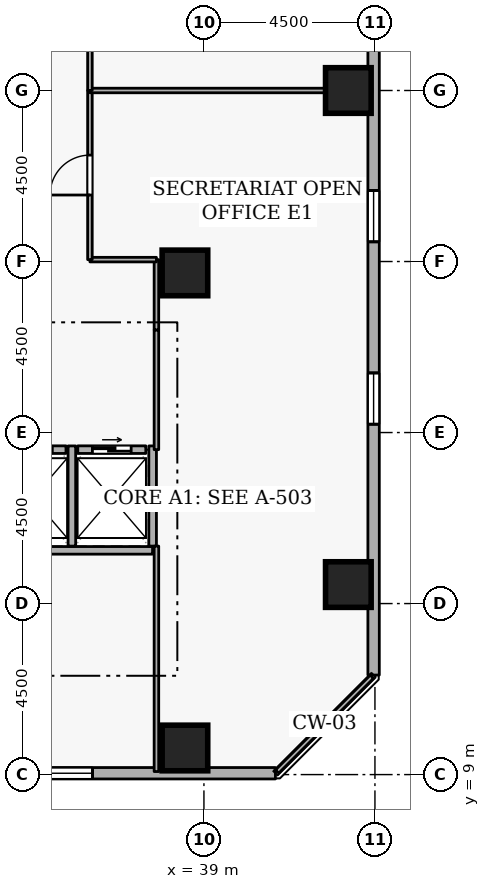
"""IFC4 building model, lengths in metres.
Left out: names, types, materials, properties, quantities, classifications, styles, units other than length and angle.
Written with IfcOpenShell. Run it as: python <this file> out.ifc"""

import sys

from ifc_helpers import new_model, si_unit, direction, frame, frame_2d, origin, origin_2d, place, context, subcontext, project, spatial, rectangle, extrude, element, fill, save


model = new_model("IFC4")
c1 = context("Model", 3, precision=1e-05, world=origin(), true_north=direction((0.0, 1.0)))
c2 = subcontext(c1, "Body", "Model", "MODEL_VIEW")
j1 = project(units=[si_unit("LENGTHUNIT", "METRE"), si_unit("PLANEANGLEUNIT", "RADIAN")], contexts=[c1])
p1 = place(None, origin())
s1 = spatial("IfcSite", under=j1, at=p1, CompositionType="ELEMENT")
p2 = place(p1, origin())
s2 = spatial("IfcBuilding", under=s1, at=p2, CompositionType="ELEMENT")
p3 = place(p2, frame((0.0, 0.0, 116.1)))
s3 = spatial("IfcBuildingStorey", under=s2, at=p3, CompositionType="ELEMENT", Elevation=116.1)
for number, where, z_axis, x_axis in (
    (1, (38.5, 9.7, 0.0), (0.0, 0.0, 1.0), (1.0, 0.0, 0.0)),
    (2, (42.8, 14.0, 0.0), (0.0, 0.0, 1.0), (1.0, 0.0, 0.0)),
    (3, (42.8, 27.0, 0.0), (0.0, 0.0, 1.0), (1.0, 0.0, 0.0)),
    (4, (38.5, 22.2, 0.0), (0.0, 0.0, 1.0), (1.0, 0.0, 0.0)),
):
    element("IfcColumn", number, at=place(p3, frame(where, z_axis=z_axis, x_axis=x_axis)), inside=s3, PredefinedType="COLUMN", context=c2, shape_type="SweptSolid", body=[
        extrude(rectangle(XDim=1.2, YDim=1.2, at=origin_2d()), origin(), (0.0, 0.0, 1.0), 3.6),
    ])
p4 = place(p3, frame((4.119, 9.035, 0.0), z_axis=(0.0, 0.0, 1.0), x_axis=(1.0, 0.0, 0.0)))
e5 = element("IfcWall", 5, at=p4, inside=s3, PredefinedType="STANDARD", context=c2, shape_type="SweptSolid", body=[
    extrude(rectangle(XDim=36.763, YDim=0.3, at=frame_2d((18.381, 0.0))), origin(), (0.0, 0.0, 1.0), 2.22),
])
p5 = place(p4, frame((1.8, 0.0, 0.72)))
e6 = element("IfcOpeningElement", 6, at=p5, cuts=e5, PredefinedType="OPENING", context=c2, shape_type="SweptSolid", body=[
    extrude(rectangle(XDim=1.35, YDim=1.05, at=frame_2d((0.675, 0.525))), frame((0.0, 0.16, 0.0), z_axis=(0.0, -1.0, 0.0), x_axis=(1.0, 0.0, 0.0)), (0.0, 0.0, 1.0), 0.32),
])
p6 = place(p4, frame((11.4, 0.0, 0.72)))
e7 = element("IfcOpeningElement", 7, at=p6, cuts=e5, PredefinedType="OPENING", context=c2, shape_type="SweptSolid", body=[
    extrude(rectangle(XDim=1.35, YDim=1.05, at=frame_2d((0.675, 0.525))), frame((0.0, 0.16, 0.0), z_axis=(0.0, -1.0, 0.0), x_axis=(1.0, 0.0, 0.0)), (0.0, 0.0, 1.0), 0.32),
])
p7 = place(p4, frame((16.2, 0.0, 0.72)))
e8 = element("IfcOpeningElement", 8, at=p7, cuts=e5, PredefinedType="OPENING", context=c2, shape_type="SweptSolid", body=[
    extrude(rectangle(XDim=1.35, YDim=1.05, at=frame_2d((0.675, 0.525))), frame((0.0, 0.16, 0.0), z_axis=(0.0, -1.0, 0.0), x_axis=(1.0, 0.0, 0.0)), (0.0, 0.0, 1.0), 0.32),
])
p8 = place(p4, frame((25.8, 0.0, 0.72)))
e9 = element("IfcOpeningElement", 9, at=p8, cuts=e5, PredefinedType="OPENING", context=c2, shape_type="SweptSolid", body=[
    extrude(rectangle(XDim=1.35, YDim=1.05, at=frame_2d((0.675, 0.525))), frame((0.0, 0.16, 0.0), z_axis=(0.0, -1.0, 0.0), x_axis=(1.0, 0.0, 0.0)), (0.0, 0.0, 1.0), 0.32),
])
p9 = place(p4, frame((30.6, 0.0, 0.72)))
e10 = element("IfcOpeningElement", 10, at=p9, cuts=e5, PredefinedType="OPENING", context=c2, shape_type="SweptSolid", body=[
    extrude(rectangle(XDim=1.35, YDim=1.05, at=frame_2d((0.675, 0.525))), frame((0.0, 0.16, 0.0), z_axis=(0.0, -1.0, 0.0), x_axis=(1.0, 0.0, 0.0)), (0.0, 0.0, 1.0), 0.32),
])
p10 = place(p3, frame((43.465, 11.619, 0.0), z_axis=(0.0, 0.0, 1.0), x_axis=(0.0, 1.0, 0.0)))
e11 = element("IfcWall", 11, at=p10, inside=s3, PredefinedType="STANDARD", context=c2, shape_type="SweptSolid", body=[
    extrude(rectangle(XDim=36.763, YDim=0.3, at=frame_2d((18.381, 0.0))), origin(), (0.0, 0.0, 1.0), 2.22),
])
p11 = place(p10, frame((6.6, 0.0, 0.72)))
e12 = element("IfcOpeningElement", 12, at=p11, cuts=e11, PredefinedType="OPENING", context=c2, shape_type="SweptSolid", body=[
    extrude(rectangle(XDim=1.35, YDim=1.05, at=frame_2d((0.675, 0.525))), frame((0.0, 0.16, 0.0), z_axis=(0.0, -1.0, 0.0), x_axis=(1.0, 0.0, 0.0)), (0.0, 0.0, 1.0), 0.32),
])
p12 = place(p10, frame((11.4, 0.0, 0.72)))
e13 = element("IfcOpeningElement", 13, at=p12, cuts=e11, PredefinedType="OPENING", context=c2, shape_type="SweptSolid", body=[
    extrude(rectangle(XDim=1.35, YDim=1.05, at=frame_2d((0.675, 0.525))), frame((0.0, 0.16, 0.0), z_axis=(0.0, -1.0, 0.0), x_axis=(1.0, 0.0, 0.0)), (0.0, 0.0, 1.0), 0.32),
])
p13 = place(p10, frame((21.0, 0.0, 0.72)))
e14 = element("IfcOpeningElement", 14, at=p13, cuts=e11, PredefinedType="OPENING", context=c2, shape_type="SweptSolid", body=[
    extrude(rectangle(XDim=1.35, YDim=1.05, at=frame_2d((0.675, 0.525))), frame((0.0, 0.16, 0.0), z_axis=(0.0, -1.0, 0.0), x_axis=(1.0, 0.0, 0.0)), (0.0, 0.0, 1.0), 0.32),
])
p14 = place(p10, frame((25.8, 0.0, 0.72)))
e15 = element("IfcOpeningElement", 15, at=p14, cuts=e11, PredefinedType="OPENING", context=c2, shape_type="SweptSolid", body=[
    extrude(rectangle(XDim=1.35, YDim=1.05, at=frame_2d((0.675, 0.525))), frame((0.0, 0.16, 0.0), z_axis=(0.0, -1.0, 0.0), x_axis=(1.0, 0.0, 0.0)), (0.0, 0.0, 1.0), 0.32),
])
p15 = place(p3, frame((33.63, 17.55, 0.0), z_axis=(0.0, 0.0, 1.0), x_axis=(1.0, 0.0, 0.0)))
e16 = element("IfcWall", 16, at=p15, inside=s3, PredefinedType="STANDARD", context=c2, shape_type="SweptSolid", body=[
    extrude(rectangle(XDim=1.74, YDim=0.2, at=frame_2d((0.87, 0.0))), origin(), (0.0, 0.0, 1.0), 3.32),
])
p16 = place(p15, frame((0.36, 0.0, 0.0)))
e17 = element("IfcOpeningElement", 17, at=p16, cuts=e16, PredefinedType="OPENING", context=c2, shape_type="SweptSolid", body=[
    extrude(rectangle(XDim=1.02, YDim=2.06, at=frame_2d((0.51, 1.03))), frame((0.0, 0.11, 0.0), z_axis=(0.0, -1.0, 0.0), x_axis=(1.0, 0.0, 0.0)), (0.0, 0.0, 1.0), 0.22),
])
p17 = place(p3, frame((35.68, 17.55, 0.0), z_axis=(0.0, 0.0, 1.0), x_axis=(1.0, 0.0, 0.0)))
e18 = element("IfcWall", 18, at=p17, inside=s3, PredefinedType="STANDARD", context=c2, shape_type="SweptSolid", body=[
    extrude(rectangle(XDim=1.79, YDim=0.2, at=frame_2d((0.895, 0.0))), origin(), (0.0, 0.0, 1.0), 3.32),
])
p18 = place(p17, frame((0.385, 0.0, 0.0)))
e19 = element("IfcOpeningElement", 19, at=p18, cuts=e18, PredefinedType="OPENING", context=c2, shape_type="SweptSolid", body=[
    extrude(rectangle(XDim=1.02, YDim=2.06, at=frame_2d((0.51, 1.03))), frame((0.0, 0.11, 0.0), z_axis=(0.0, -1.0, 0.0), x_axis=(1.0, 0.0, 0.0)), (0.0, 0.0, 1.0), 0.22),
])
p19 = place(p3, frame((33.452, 14.9, 0.0), z_axis=(0.0, 0.0, 1.0), x_axis=(1.0, 0.0, 0.0)))
e20 = element("IfcWall", 20, at=p19, inside=s3, PredefinedType="STANDARD", context=c2, shape_type="SweptSolid", body=[
    extrude(rectangle(XDim=4.196, YDim=0.2, at=frame_2d((2.098, 0.0))), origin(), (0.0, 0.0, 1.0), 3.32),
])
for number, where, z_axis, x_axis in (
    (21, (35.525, 15.012, 0.0), (0.0, 0.0, 1.0), (0.0, 1.0, 0.0)),
    (22, (37.65, 15.012, 0.0), (0.0, 0.0, 1.0), (0.0, 1.0, 0.0)),
):
    element("IfcWall", number, at=place(p3, frame(where, z_axis=z_axis, x_axis=x_axis)), inside=s3, PredefinedType="STANDARD", context=c2, shape_type="SweptSolid", body=[
        extrude(rectangle(XDim=2.636, YDim=0.2, at=frame_2d((1.318, 0.0))), origin(), (0.0, 0.0, 1.0), 3.32),
    ])
p20 = place(p3, frame((37.75, 17.55, 0.0), z_axis=(0.0, 0.0, 1.0), x_axis=(0.0, 1.0, 0.0)))
e23 = element("IfcWall", 23, at=p20, inside=s3, PredefinedType="PARTITIONING", context=c2, shape_type="SweptSolid", body=[
    extrude(rectangle(XDim=3.15, YDim=0.12, at=frame_2d((1.575, 0.0))), origin(), (0.0, 0.0, 1.0), 3.32),
])
p21 = place(p3, frame((37.75, 20.7, 0.0), z_axis=(0.0, 0.0, 1.0), x_axis=(0.0, 1.0, 0.0)))
e24 = element("IfcWall", 24, at=p21, inside=s3, PredefinedType="PARTITIONING", context=c2, shape_type="SweptSolid", body=[
    extrude(rectangle(XDim=1.85, YDim=0.12, at=frame_2d((0.925, 0.0))), origin(), (0.0, 0.0, 1.0), 3.32),
])
p22 = place(p3, frame((37.75, 22.55, 0.0), z_axis=(0.0, 0.0, 1.0), x_axis=(-1.0, 0.0, 0.0)))
e25 = element("IfcWall", 25, at=p22, inside=s3, PredefinedType="PARTITIONING", context=c2, shape_type="SweptSolid", body=[
    extrude(rectangle(XDim=1.75, YDim=0.12, at=frame_2d((0.875, 0.0))), origin(), (0.0, 0.0, 1.0), 3.32),
])
p23 = place(p3, frame((36.0, 22.55, 0.0), z_axis=(0.0, 0.0, 1.0), x_axis=(0.0, 1.0, 0.0)))
e26 = element("IfcWall", 26, at=p23, inside=s3, PredefinedType="PARTITIONING", context=c2, shape_type="SweptSolid", body=[
    extrude(rectangle(XDim=4.45, YDim=0.12, at=frame_2d((2.225, 0.0))), origin(), (0.0, 0.0, 1.0), 3.32),
])
p24 = place(p23, frame((1.7, 0.0, 0.0)))
e27 = element("IfcOpeningElement", 27, at=p24, cuts=e26, PredefinedType="OPENING", context=c2, shape_type="SweptSolid", body=[
    extrude(rectangle(XDim=1.05, YDim=2.1, at=frame_2d((0.525, 1.05))), frame((0.0, 0.07, 0.0), z_axis=(0.0, -1.0, 0.0), x_axis=(1.0, 0.0, 0.0)), (0.0, 0.0, 1.0), 0.14),
])
p25 = place(p3, frame((36.0, 27.0, 0.0), z_axis=(0.0, 0.0, 1.0), x_axis=(1.0, 0.0, 0.0)))
e28 = element("IfcWall", 28, at=p25, inside=s3, PredefinedType="PARTITIONING", context=c2, shape_type="SweptSolid", body=[
    extrude(rectangle(XDim=7.42, YDim=0.12, at=frame_2d((3.71, 0.0))), origin(), (0.0, 0.0, 1.0), 2.862),
])
p26 = place(p3, frame((43.42, 11.575, 0.0), z_axis=(0.0, 0.0, 1.0), x_axis=(-0.707106781187, -0.707106781187, 0.0)))
e29 = element("IfcWall", 29, at=p26, inside=s3, PredefinedType="PARTITIONING", context=c2, shape_type="SweptSolid", body=[
    extrude(rectangle(XDim=3.528, YDim=0.12, at=frame_2d((1.764, 0.0))), origin(), (0.0, 0.0, 1.0), 3.32),
])
p27 = place(p3, frame((37.75, 9.08, 0.0), z_axis=(0.0, 0.0, 1.0), x_axis=(0.0, 1.0, 0.0)))
e30 = element("IfcWall", 30, at=p27, inside=s3, PredefinedType="PARTITIONING", context=c2, shape_type="SweptSolid", body=[
    extrude(rectangle(XDim=5.932, YDim=0.12, at=frame_2d((2.966, 0.0))), origin(), (0.0, 0.0, 1.0), 3.32),
])
p28 = place(p3, frame((36.0, 27.0, 0.0), z_axis=(0.0, 0.0, 1.0), x_axis=(0.0, 1.0, 0.0)))
e31 = element("IfcWall", 31, at=p28, inside=s3, PredefinedType="PARTITIONING", context=c2, shape_type="SweptSolid", body=[
    extrude(rectangle(XDim=3.15, YDim=0.12, at=frame_2d((1.575, 0.0))), origin(), (0.0, 0.0, 1.0), 3.32),
])
p29 = place(p28, frame((1.1, 0.0, 0.0)))
e32 = element("IfcOpeningElement", 32, at=p29, cuts=e31, PredefinedType="OPENING", context=c2, shape_type="SweptSolid", body=[
    extrude(rectangle(XDim=0.95, YDim=2.1, at=frame_2d((0.475, 1.05))), frame((0.0, 0.07, 0.0), z_axis=(0.0, -1.0, 0.0), x_axis=(1.0, 0.0, 0.0)), (0.0, 0.0, 1.0), 0.14),
])
p30 = place(p9, origin())
e33 = element("IfcWindow", 33, at=p30, inside=s3, PartitioningType="SINGLE_PANEL", PredefinedType="WINDOW", context=c2, shape_type="SweptSolid", body=[
    extrude(rectangle(XDim=1.35, YDim=1.05, at=frame_2d((0.675, 0.525))), frame((0.0, 0.03, 0.0), z_axis=(0.0, -1.0, 0.0), x_axis=(1.0, 0.0, 0.0)), (0.0, 0.0, 1.0), 0.06),
])
fill(e10, e33)
p31 = place(p11, origin())
e34 = element("IfcWindow", 34, at=p31, inside=s3, PartitioningType="SINGLE_PANEL", PredefinedType="WINDOW", context=c2, shape_type="SweptSolid", body=[
    extrude(rectangle(XDim=1.35, YDim=1.05, at=frame_2d((0.675, 0.525))), frame((0.0, 0.03, 0.0), z_axis=(0.0, -1.0, 0.0), x_axis=(1.0, 0.0, 0.0)), (0.0, 0.0, 1.0), 0.06),
])
fill(e12, e34)
p32 = place(p12, origin())
e35 = element("IfcWindow", 35, at=p32, inside=s3, PartitioningType="SINGLE_PANEL", PredefinedType="WINDOW", context=c2, shape_type="SweptSolid", body=[
    extrude(rectangle(XDim=1.35, YDim=1.05, at=frame_2d((0.675, 0.525))), frame((0.0, 0.03, 0.0), z_axis=(0.0, -1.0, 0.0), x_axis=(1.0, 0.0, 0.0)), (0.0, 0.0, 1.0), 0.06),
])
fill(e13, e35)
p33 = place(p16, origin())
e36 = element("IfcDoor", 36, at=p33, inside=s3, OperationType="SLIDING_TO_LEFT", PredefinedType="DOOR", context=c2, shape_type="SweptSolid", body=[
    extrude(rectangle(XDim=1.02, YDim=2.06, at=frame_2d((0.51, 1.03))), frame((0.0, 0.025, 0.0), z_axis=(0.0, -1.0, 0.0), x_axis=(1.0, 0.0, 0.0)), (0.0, 0.0, 1.0), 0.05),
])
fill(e17, e36)
p34 = place(p18, origin())
e37 = element("IfcDoor", 37, at=p34, inside=s3, OperationType="SLIDING_TO_LEFT", PredefinedType="DOOR", context=c2, shape_type="SweptSolid", body=[
    extrude(rectangle(XDim=1.02, YDim=2.06, at=frame_2d((0.51, 1.03))), frame((0.0, 0.025, 0.0), z_axis=(0.0, -1.0, 0.0), x_axis=(1.0, 0.0, 0.0)), (0.0, 0.0, 1.0), 0.05),
])
fill(e19, e37)
p35 = place(p24, origin())
e38 = element("IfcDoor", 38, at=p35, inside=s3, OperationType="SINGLE_SWING_LEFT", PredefinedType="DOOR", context=c2, shape_type="SweptSolid", body=[
    extrude(rectangle(XDim=1.05, YDim=2.1, at=frame_2d((0.525, 1.05))), frame((0.0, 0.025, 0.0), z_axis=(0.0, -1.0, 0.0), x_axis=(1.0, 0.0, 0.0)), (0.0, 0.0, 1.0), 0.05),
])
fill(e27, e38)
save(model, sys.argv[1])
